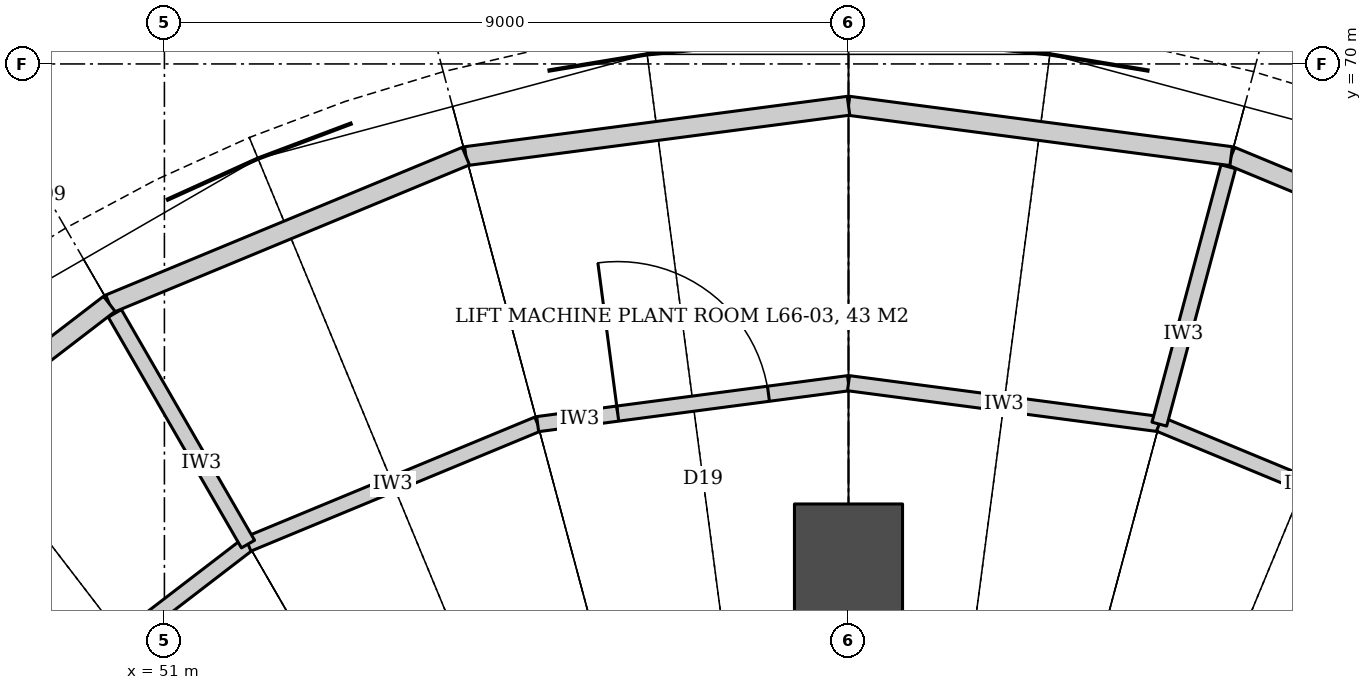
"""IFC4 building model, lengths in metres.
Left out: names, types, materials, properties, quantities, classifications, styles, units other than length and angle.
Written with IfcOpenShell. Run it as: python <this file> out.ifc"""

import sys

from ifc_helpers import new_model, si_unit, direction, frame, frame_2d, origin, origin_2d, place, context, subcontext, project, spatial, polyline, rectangle, hollow_circle, outline, extrude, element, fill, save


model = new_model("IFC4")
c1 = context("Model", 3, precision=1e-05, world=origin(), true_north=direction((0.0, 1.0)))
c2 = subcontext(c1, "Body", "Model", "MODEL_VIEW")
j1 = project(units=[si_unit("LENGTHUNIT", "METRE"), si_unit("PLANEANGLEUNIT", "RADIAN")], contexts=[c1])
p1 = place(None, origin())
s1 = spatial("IfcSite", under=j1, at=p1, CompositionType="ELEMENT")
p2 = place(p1, origin())
s2 = spatial("IfcBuilding", under=s1, at=p2, CompositionType="ELEMENT")
p3 = place(p2, frame((0.0, 0.0, 286.4)))
s3 = spatial("IfcBuildingStorey", under=s2, at=p3, CompositionType="ELEMENT", Elevation=286.4)
p4 = place(p3, frame((60.0, 63.5, -0.25), z_axis=(0.0, 0.0, 1.0), x_axis=(1.0, 0.0, 0.0)))
e1 = element("IfcColumn", 1, at=p4, inside=s3, PredefinedType="COLUMN", context=c2, shape_type="SweptSolid", body=[
    extrude(hollow_circle(Radius=0.711, WallThickness=0.07, at=origin_2d()), origin(), (0.0, 0.0, 1.0), 15.486),
])
p5 = place(p3, frame((48.828, 61.172, 0.0), z_axis=(0.0, 0.0, 1.0), x_axis=(0.793389099494, 0.608714823874, 0.0)))
e2 = element("IfcWall", 2, at=p5, inside=s3, PredefinedType="PARTITIONING", context=c2, shape_type="SweptSolid", body=[
    extrude(rectangle(XDim=4.125, YDim=0.2, at=frame_2d((2.062, 0.0))), origin(), (0.0, 0.0, 1.0), 4.15),
])
p6 = place(p3, frame((52.1, 63.683, 0.0), z_axis=(0.0, 0.0, 1.0), x_axis=(0.923859551549, 0.382731667114, 0.0)))
e3 = element("IfcWall", 3, at=p6, inside=s3, PredefinedType="PARTITIONING", context=c2, shape_type="SweptSolid", body=[
    extrude(rectangle(XDim=4.125, YDim=0.2, at=frame_2d((2.062, 0.0))), origin(), (0.0, 0.0, 1.0), 4.15),
])
p7 = place(p3, frame((55.911, 65.262, 0.0), z_axis=(0.0, 0.0, 1.0), x_axis=(0.991446234996, 0.130515758099, 0.0)))
e4 = element("IfcWall", 4, at=p7, inside=s3, PredefinedType="PARTITIONING", context=c2, shape_type="SweptSolid", body=[
    extrude(rectangle(XDim=4.125, YDim=0.2, at=frame_2d((2.062, 0.0))), origin(), (0.0, 0.0, 1.0), 4.15),
])
p8 = place(p7, frame((1.062, 0.0, 0.0)))
e5 = element("IfcOpeningElement", 5, at=p8, cuts=e4, PredefinedType="OPENING", context=c2, shape_type="SweptSolid", body=[
    extrude(rectangle(XDim=2.0, YDim=2.4, at=frame_2d((1.0, 1.2))), frame((0.0, 0.11, 0.0), z_axis=(0.0, -1.0, 0.0), x_axis=(1.0, 0.0, 0.0)), (0.0, 0.0, 1.0), 0.22),
])
p9 = place(p3, frame((60.0, 65.8, 0.0), z_axis=(0.0, 0.0, 1.0), x_axis=(0.991446234996, -0.130515758099, 0.0)))
e6 = element("IfcWall", 6, at=p9, inside=s3, PredefinedType="PARTITIONING", context=c2, shape_type="SweptSolid", body=[
    extrude(rectangle(XDim=4.125, YDim=0.2, at=frame_2d((2.062, 0.0))), origin(), (0.0, 0.0, 1.0), 4.15),
])
p10 = place(p3, frame((64.089, 65.262, 0.0), z_axis=(0.0, 0.0, 1.0), x_axis=(0.923859551549, -0.382731667114, 0.0)))
e7 = element("IfcWall", 7, at=p10, inside=s3, PredefinedType="PARTITIONING", context=c2, shape_type="SweptSolid", body=[
    extrude(rectangle(XDim=4.125, YDim=0.2, at=frame_2d((2.062, 0.0))), origin(), (0.0, 0.0, 1.0), 4.15),
])
p11 = place(p3, frame((64.089, 65.262, 0.0), z_axis=(0.0, 0.0, 1.0), x_axis=(0.258841697179, 0.965919756399, 0.0)))
e8 = element("IfcWall", 8, at=p11, inside=s3, PredefinedType="PARTITIONING", context=c2, shape_type="SweptSolid", body=[
    extrude(rectangle(XDim=3.505, YDim=0.2, at=frame_2d((1.752, 0.0))), origin(), (0.0, 0.0, 1.0), 4.15),
])
p12 = place(p3, frame((52.1, 63.683, 0.0), z_axis=(0.0, 0.0, 1.0), x_axis=(-0.500042005822, 0.866001150353, 0.0)))
e9 = element("IfcWall", 9, at=p12, inside=s3, PredefinedType="PARTITIONING", context=c2, shape_type="SweptSolid", body=[
    extrude(rectangle(XDim=3.505, YDim=0.2, at=frame_2d((1.752, 0.0))), origin(), (0.0, 0.0, 1.0), 4.15),
])
p13 = place(p3, frame((69.725, 66.844, 0.0), z_axis=(0.0, 0.0, 1.0), x_axis=(-0.923881463636, 0.382678770184, 0.0)))
e10 = element("IfcWall", 10, at=p13, inside=s3, PredefinedType="SOLIDWALL", context=c2, shape_type="SweptSolid", body=[
    extrude(outline(polyline([(0.0, 0.0), (5.078, 0.0), (5.077, 17.9), (0.0, 17.269), (0.0, 0.0)])), frame((0.0, 0.125, 0.0), z_axis=(0.0, -1.0, 0.0), x_axis=(1.0, 0.0, 0.0)), (0.0, 0.0, 1.0), 0.25),
])
p14 = place(p3, frame((65.034, 68.787, 0.0), z_axis=(0.0, 0.0, 1.0), x_axis=(-0.991448238941, 0.130500534482, 0.0)))
e11 = element("IfcWall", 11, at=p14, inside=s3, PredefinedType="SOLIDWALL", context=c2, shape_type="SweptSolid", body=[
    extrude(outline(polyline([(0.0, 0.0), (5.077, 0.0), (5.077, 18.116), (0.0, 17.9), (0.0, 0.0)])), frame((0.0, 0.125, 0.0), z_axis=(0.0, -1.0, 0.0), x_axis=(1.0, 0.0, 0.0)), (0.0, 0.0, 1.0), 0.25),
])
p15 = place(p3, frame((60.0, 69.45, 0.0), z_axis=(0.0, 0.0, 1.0), x_axis=(-0.991448238941, -0.130500534482, 0.0)))
e12 = element("IfcWall", 12, at=p15, inside=s3, PredefinedType="SOLIDWALL", context=c2, shape_type="SweptSolid", body=[
    extrude(outline(polyline([(0.0, 0.0), (5.077, 0.0), (5.077, 17.9), (0.0, 18.116), (0.0, 0.0)])), frame((0.0, 0.125, 0.0), z_axis=(0.0, -1.0, 0.0), x_axis=(1.0, 0.0, 0.0)), (0.0, 0.0, 1.0), 0.25),
])
p16 = place(p3, frame((54.966, 68.787, 0.0), z_axis=(0.0, 0.0, 1.0), x_axis=(-0.923881463636, -0.382678770184, 0.0)))
e13 = element("IfcWall", 13, at=p16, inside=s3, PredefinedType="SOLIDWALL", context=c2, shape_type="SweptSolid", body=[
    extrude(outline(polyline([(0.0, 0.0), (5.078, 0.0), (5.077, 17.269), (0.0, 17.9), (0.0, 0.0)])), frame((0.0, 0.125, 0.0), z_axis=(0.0, -1.0, 0.0), x_axis=(1.0, 0.0, 0.0)), (0.0, 0.0, 1.0), 0.25),
])
p17 = place(p3, frame((50.275, 66.844, 0.0), z_axis=(0.0, 0.0, 1.0), x_axis=(-0.793333089115, -0.608787819946, 0.0)))
e14 = element("IfcWall", 14, at=p17, inside=s3, PredefinedType="SOLIDWALL", context=c2, shape_type="SweptSolid", body=[
    extrude(outline(polyline([(0.0, 0.0), (5.077, 0.0), (5.077, 16.265), (0.0, 17.269), (0.0, 0.0)])), frame((0.0, 0.125, 0.0), z_axis=(0.0, -1.0, 0.0), x_axis=(1.0, 0.0, 0.0)), (0.0, 0.0, 1.0), 0.25),
])
p18 = place(p8, origin())
e15 = element("IfcDoor", 15, at=p18, inside=s3, OperationType="DOUBLE_DOOR_DOUBLE_SWING", PredefinedType="DOOR", context=c2, shape_type="SweptSolid", body=[
    extrude(rectangle(XDim=2.0, YDim=2.4, at=frame_2d((1.0, 1.2))), frame((0.0, 0.025, 0.0), z_axis=(0.0, -1.0, 0.0), x_axis=(1.0, 0.0, 0.0)), (0.0, 0.0, 1.0), 0.05),
])
fill(e5, e15)
save(model, sys.argv[1])
